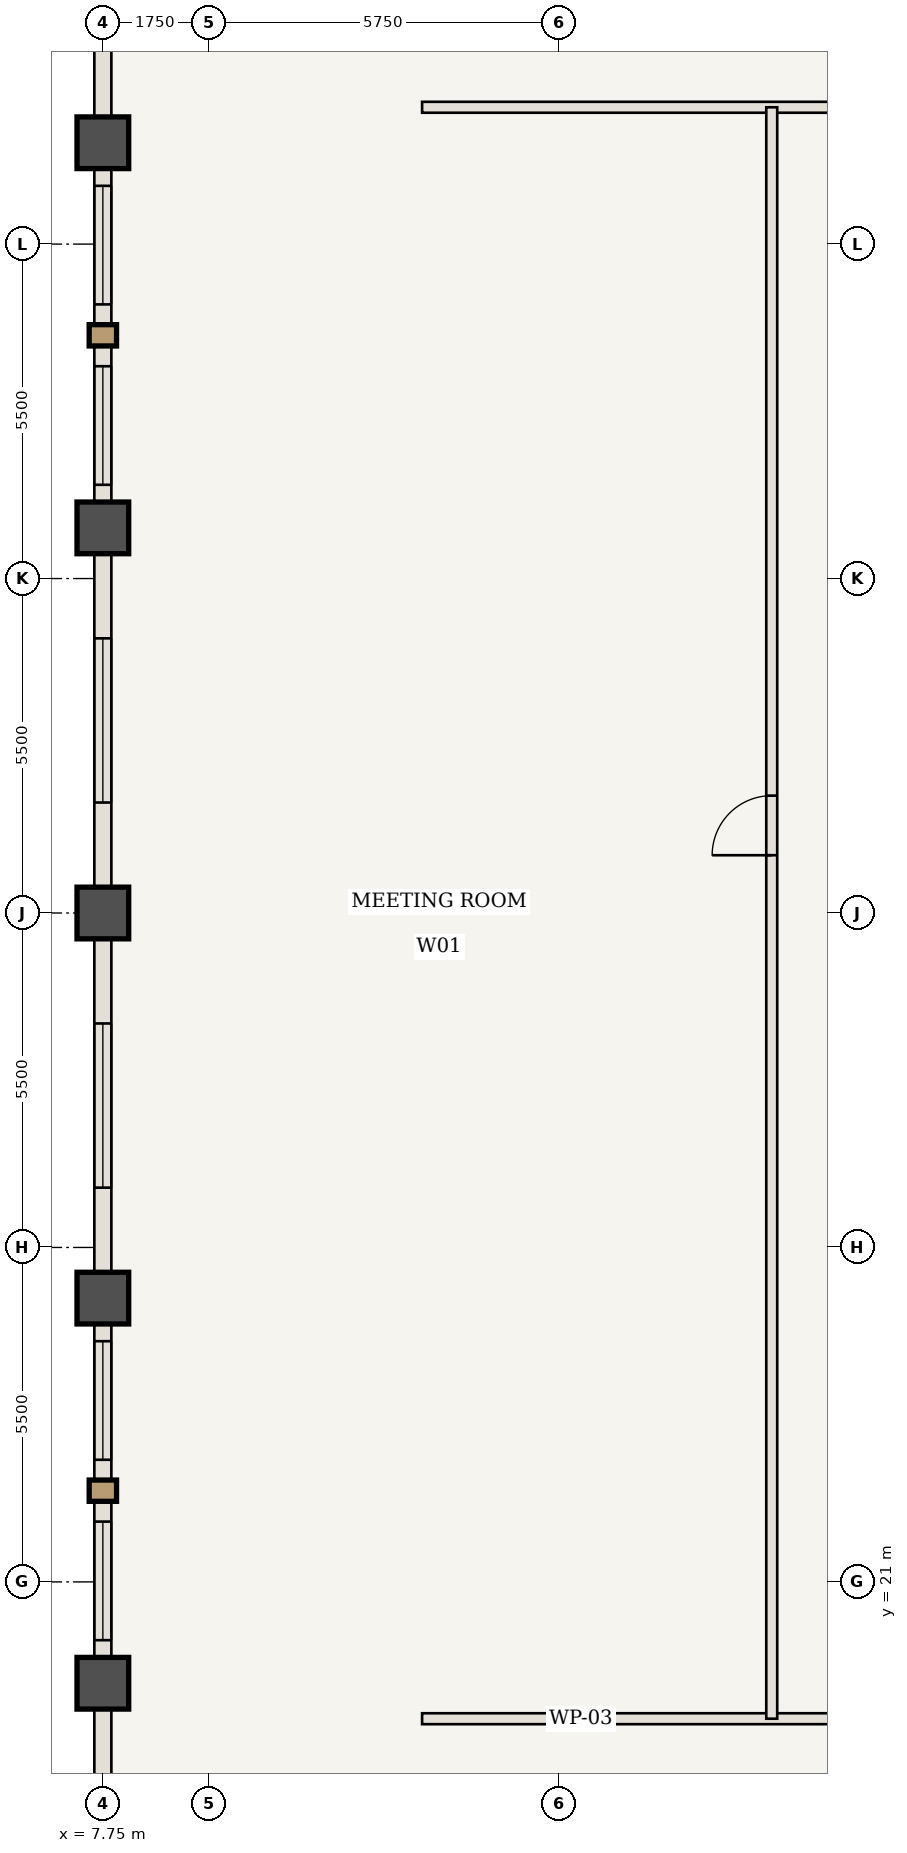
"""IFC4 building model, lengths in metres.
Left out: names, types, materials, properties, quantities, classifications, styles, units other than length and angle.
Written with IfcOpenShell. Run it as: python <this file> out.ifc"""

import sys

from ifc_helpers import new_model, si_unit, direction, frame, frame_2d, origin, origin_2d, place, context, subcontext, project, spatial, rectangle, extrude, element, fill, save


model = new_model("IFC4")
c1 = context("Model", 3, precision=1e-05, world=origin(), true_north=direction((0.0, 1.0)))
c2 = subcontext(c1, "Body", "Model", "MODEL_VIEW")
j1 = project(units=[si_unit("LENGTHUNIT", "METRE"), si_unit("PLANEANGLEUNIT", "RADIAN")], contexts=[c1])
p1 = place(None, origin())
s1 = spatial("IfcSite", under=j1, at=p1, CompositionType="ELEMENT")
p2 = place(p1, origin())
s2 = spatial("IfcBuilding", under=s1, at=p2, CompositionType="ELEMENT")
p3 = place(p2, frame((0.0, 0.0, 233.1)))
s3 = spatial("IfcBuildingStorey", under=s2, at=p3, CompositionType="ELEMENT", Elevation=233.1)
for number, where, z_axis, x_axis in (
    (1, (7.75, 19.333, 0.0), (0.0, 0.0, 1.0), (1.0, 0.0, 0.0)),
    (2, (7.75, 25.667, 0.0), (0.0, 0.0, 1.0), (1.0, 0.0, 0.0)),
    (3, (7.75, 32.0, 0.0), (0.0, 0.0, 1.0), (1.0, 0.0, 0.0)),
    (4, (7.75, 38.333, 0.0), (0.0, 0.0, 1.0), (1.0, 0.0, 0.0)),
    (5, (7.75, 44.667, 0.0), (0.0, 0.0, 1.0), (1.0, 0.0, 0.0)),
):
    element("IfcColumn", number, at=place(p3, frame(where, z_axis=z_axis, x_axis=x_axis)), inside=s3, PredefinedType="COLUMN", context=c2, shape_type="SweptSolid", body=[
        extrude(rectangle(XDim=0.85, YDim=0.85, at=origin_2d()), origin(), (0.0, 0.0, 1.0), 3.85),
    ])
p4 = place(p3, frame((13.0, 18.75, 0.0), z_axis=(0.0, 0.0, 1.0), x_axis=(1.0, 0.0, 0.0)))
e6 = element("IfcWall", 6, at=p4, inside=s3, PredefinedType="STANDARD", context=c2, shape_type="SweptSolid", body=[
    extrude(rectangle(XDim=11.867, YDim=0.18, at=frame_2d((5.933, 0.0))), origin(), (0.0, 0.0, 1.0), 3.685),
])
p5 = place(p4, frame((6.858, 0.0, 0.0)))
e7 = element("IfcOpeningElement", 7, at=p5, cuts=e6, PredefinedType="OPENING", context=c2, shape_type="SweptSolid", body=[
    extrude(rectangle(XDim=0.98, YDim=2.2, at=frame_2d((0.49, 1.1))), frame((0.0, 0.1, 0.0), z_axis=(0.0, -1.0, 0.0), x_axis=(1.0, 0.0, 0.0)), (0.0, 0.0, 1.0), 0.2),
])
p6 = place(p3, frame((13.0, 45.25, 0.0), z_axis=(0.0, 0.0, 1.0), x_axis=(1.0, 0.0, 0.0)))
e8 = element("IfcWall", 8, at=p6, inside=s3, PredefinedType="STANDARD", context=c2, shape_type="SweptSolid", body=[
    extrude(rectangle(XDim=19.6, YDim=0.18, at=frame_2d((9.8, 0.0))), origin(), (0.0, 0.0, 1.0), 3.685),
])
p7 = place(p6, frame((12.175, 0.0, 0.0)))
e9 = element("IfcOpeningElement", 9, at=p7, cuts=e8, PredefinedType="OPENING", context=c2, shape_type="SweptSolid", body=[
    extrude(rectangle(XDim=0.98, YDim=2.2, at=frame_2d((0.49, 1.1))), frame((0.0, 0.1, 0.0), z_axis=(0.0, -1.0, 0.0), x_axis=(1.0, 0.0, 0.0)), (0.0, 0.0, 1.0), 0.2),
])
p8 = place(p3, frame((18.75, 18.75, 0.0), z_axis=(0.0, 0.0, 1.0), x_axis=(0.0, 1.0, 0.0)))
e10 = element("IfcWall", 10, at=p8, inside=s3, PredefinedType="STANDARD", context=c2, shape_type="SweptSolid", body=[
    extrude(rectangle(XDim=26.5, YDim=0.18, at=frame_2d((13.25, 0.0))), origin(), (0.0, 0.0, 1.0), 3.685),
])
p9 = place(p8, frame((14.2, 0.0, 0.0)))
e11 = element("IfcOpeningElement", 11, at=p9, cuts=e10, PredefinedType="OPENING", context=c2, shape_type="SweptSolid", body=[
    extrude(rectangle(XDim=0.98, YDim=2.2, at=frame_2d((0.49, 1.1))), frame((0.0, 0.1, 0.0), z_axis=(0.0, -1.0, 0.0), x_axis=(1.0, 0.0, 0.0)), (0.0, 0.0, 1.0), 0.2),
])
p10 = place(p3, frame((7.75, 13.0, 0.0), z_axis=(0.0, 0.0, 1.0), x_axis=(0.0, 1.0, 0.0)))
e12 = element("IfcWall", 12, at=p10, inside=s3, PredefinedType="USERDEFINED", context=c2, shape_type="SweptSolid", body=[
    extrude(rectangle(XDim=6.333, YDim=0.28, at=frame_2d((3.167, 0.0))), origin(), (0.0, 0.0, 1.0), 2.985),
])
p11 = place(p3, frame((7.75, 19.333, 0.0), z_axis=(0.0, 0.0, 1.0), x_axis=(0.0, 1.0, 0.0)))
e13 = element("IfcWall", 13, at=p11, inside=s3, PredefinedType="USERDEFINED", context=c2, shape_type="SweptSolid", body=[
    extrude(rectangle(XDim=6.333, YDim=0.28, at=frame_2d((3.167, 0.0))), origin(), (0.0, 0.0, 1.0), 2.985),
])
p12 = place(p11, frame((0.708, 0.0, 0.85)))
e14 = element("IfcOpeningElement", 14, at=p12, cuts=e13, PredefinedType="OPENING", context=c2, shape_type="SweptSolid", body=[
    extrude(rectangle(XDim=1.95, YDim=1.935, at=frame_2d((0.975, 0.968))), frame((0.0, 0.15, 0.0), z_axis=(0.0, -1.0, 0.0), x_axis=(1.0, 0.0, 0.0)), (0.0, 0.0, 1.0), 0.3),
])
p13 = place(p11, frame((3.675, 0.0, 0.85)))
e15 = element("IfcOpeningElement", 15, at=p13, cuts=e13, PredefinedType="OPENING", context=c2, shape_type="SweptSolid", body=[
    extrude(rectangle(XDim=1.95, YDim=1.935, at=frame_2d((0.975, 0.968))), frame((0.0, 0.15, 0.0), z_axis=(0.0, -1.0, 0.0), x_axis=(1.0, 0.0, 0.0)), (0.0, 0.0, 1.0), 0.3),
])
p14 = place(p3, frame((7.75, 25.667, 0.0), z_axis=(0.0, 0.0, 1.0), x_axis=(0.0, 1.0, 0.0)))
e16 = element("IfcWall", 16, at=p14, inside=s3, PredefinedType="USERDEFINED", context=c2, shape_type="SweptSolid", body=[
    extrude(rectangle(XDim=6.333, YDim=0.28, at=frame_2d((3.167, 0.0))), origin(), (0.0, 0.0, 1.0), 2.985),
])
p15 = place(p14, frame((1.817, 0.0, 0.85)))
e17 = element("IfcOpeningElement", 17, at=p15, cuts=e16, PredefinedType="OPENING", context=c2, shape_type="SweptSolid", body=[
    extrude(rectangle(XDim=2.7, YDim=1.935, at=frame_2d((1.35, 0.968))), frame((0.0, 0.15, 0.0), z_axis=(0.0, -1.0, 0.0), x_axis=(1.0, 0.0, 0.0)), (0.0, 0.0, 1.0), 0.3),
])
p16 = place(p3, frame((7.75, 32.0, 0.0), z_axis=(0.0, 0.0, 1.0), x_axis=(0.0, 1.0, 0.0)))
e18 = element("IfcWall", 18, at=p16, inside=s3, PredefinedType="USERDEFINED", context=c2, shape_type="SweptSolid", body=[
    extrude(rectangle(XDim=6.333, YDim=0.28, at=frame_2d((3.167, 0.0))), origin(), (0.0, 0.0, 1.0), 2.985),
])
p17 = place(p16, frame((1.817, 0.0, 0.85)))
e19 = element("IfcOpeningElement", 19, at=p17, cuts=e18, PredefinedType="OPENING", context=c2, shape_type="SweptSolid", body=[
    extrude(rectangle(XDim=2.7, YDim=1.935, at=frame_2d((1.35, 0.968))), frame((0.0, 0.15, 0.0), z_axis=(0.0, -1.0, 0.0), x_axis=(1.0, 0.0, 0.0)), (0.0, 0.0, 1.0), 0.3),
])
p18 = place(p3, frame((7.75, 38.333, 0.0), z_axis=(0.0, 0.0, 1.0), x_axis=(0.0, 1.0, 0.0)))
e20 = element("IfcWall", 20, at=p18, inside=s3, PredefinedType="USERDEFINED", context=c2, shape_type="SweptSolid", body=[
    extrude(rectangle(XDim=6.333, YDim=0.28, at=frame_2d((3.167, 0.0))), origin(), (0.0, 0.0, 1.0), 2.985),
])
p19 = place(p18, frame((0.708, 0.0, 0.85)))
e21 = element("IfcOpeningElement", 21, at=p19, cuts=e20, PredefinedType="OPENING", context=c2, shape_type="SweptSolid", body=[
    extrude(rectangle(XDim=1.95, YDim=1.935, at=frame_2d((0.975, 0.968))), frame((0.0, 0.15, 0.0), z_axis=(0.0, -1.0, 0.0), x_axis=(1.0, 0.0, 0.0)), (0.0, 0.0, 1.0), 0.3),
])
p20 = place(p18, frame((3.675, 0.0, 0.85)))
e22 = element("IfcOpeningElement", 22, at=p20, cuts=e20, PredefinedType="OPENING", context=c2, shape_type="SweptSolid", body=[
    extrude(rectangle(XDim=1.95, YDim=1.935, at=frame_2d((0.975, 0.968))), frame((0.0, 0.15, 0.0), z_axis=(0.0, -1.0, 0.0), x_axis=(1.0, 0.0, 0.0)), (0.0, 0.0, 1.0), 0.3),
])
p21 = place(p3, frame((7.75, 44.667, 0.0), z_axis=(0.0, 0.0, 1.0), x_axis=(0.0, 1.0, 0.0)))
e23 = element("IfcWall", 23, at=p21, inside=s3, PredefinedType="USERDEFINED", context=c2, shape_type="SweptSolid", body=[
    extrude(rectangle(XDim=6.333, YDim=0.28, at=frame_2d((3.167, 0.0))), origin(), (0.0, 0.0, 1.0), 2.985),
])
p22 = place(p9, origin())
e24 = element("IfcDoor", 24, at=p22, inside=s3, OperationType="SINGLE_SWING_LEFT", PredefinedType="DOOR", context=c2, shape_type="SweptSolid", body=[
    extrude(rectangle(XDim=0.98, YDim=2.2, at=frame_2d((0.49, 1.1))), frame((0.0, 0.025, 0.0), z_axis=(0.0, -1.0, 0.0), x_axis=(1.0, 0.0, 0.0)), (0.0, 0.0, 1.0), 0.05),
])
fill(e11, e24)
p23 = place(p12, origin())
e25 = element("IfcWindow", 25, at=p23, inside=s3, PartitioningType="SINGLE_PANEL", PredefinedType="WINDOW", context=c2, shape_type="SweptSolid", body=[
    extrude(rectangle(XDim=1.95, YDim=1.935, at=frame_2d((0.975, 0.968))), frame((0.0, 0.03, 0.0), z_axis=(0.0, -1.0, 0.0), x_axis=(1.0, 0.0, 0.0)), (0.0, 0.0, 1.0), 0.06),
])
fill(e14, e25)
p24 = place(p13, origin())
e26 = element("IfcWindow", 26, at=p24, inside=s3, PartitioningType="SINGLE_PANEL", PredefinedType="WINDOW", context=c2, shape_type="SweptSolid", body=[
    extrude(rectangle(XDim=1.95, YDim=1.935, at=frame_2d((0.975, 0.968))), frame((0.0, 0.03, 0.0), z_axis=(0.0, -1.0, 0.0), x_axis=(1.0, 0.0, 0.0)), (0.0, 0.0, 1.0), 0.06),
])
fill(e15, e26)
p25 = place(p15, origin())
e27 = element("IfcWindow", 27, at=p25, inside=s3, PartitioningType="SINGLE_PANEL", PredefinedType="WINDOW", context=c2, shape_type="SweptSolid", body=[
    extrude(rectangle(XDim=2.7, YDim=1.935, at=frame_2d((1.35, 0.968))), frame((0.0, 0.03, 0.0), z_axis=(0.0, -1.0, 0.0), x_axis=(1.0, 0.0, 0.0)), (0.0, 0.0, 1.0), 0.06),
])
fill(e17, e27)
p26 = place(p17, origin())
e28 = element("IfcWindow", 28, at=p26, inside=s3, PartitioningType="SINGLE_PANEL", PredefinedType="WINDOW", context=c2, shape_type="SweptSolid", body=[
    extrude(rectangle(XDim=2.7, YDim=1.935, at=frame_2d((1.35, 0.968))), frame((0.0, 0.03, 0.0), z_axis=(0.0, -1.0, 0.0), x_axis=(1.0, 0.0, 0.0)), (0.0, 0.0, 1.0), 0.06),
])
fill(e19, e28)
p27 = place(p19, origin())
e29 = element("IfcWindow", 29, at=p27, inside=s3, PartitioningType="SINGLE_PANEL", PredefinedType="WINDOW", context=c2, shape_type="SweptSolid", body=[
    extrude(rectangle(XDim=1.95, YDim=1.935, at=frame_2d((0.975, 0.968))), frame((0.0, 0.03, 0.0), z_axis=(0.0, -1.0, 0.0), x_axis=(1.0, 0.0, 0.0)), (0.0, 0.0, 1.0), 0.06),
])
fill(e21, e29)
p28 = place(p20, origin())
e30 = element("IfcWindow", 30, at=p28, inside=s3, PartitioningType="SINGLE_PANEL", PredefinedType="WINDOW", context=c2, shape_type="SweptSolid", body=[
    extrude(rectangle(XDim=1.95, YDim=1.935, at=frame_2d((0.975, 0.968))), frame((0.0, 0.03, 0.0), z_axis=(0.0, -1.0, 0.0), x_axis=(1.0, 0.0, 0.0)), (0.0, 0.0, 1.0), 0.06),
])
fill(e22, e30)
save(model, sys.argv[1])
